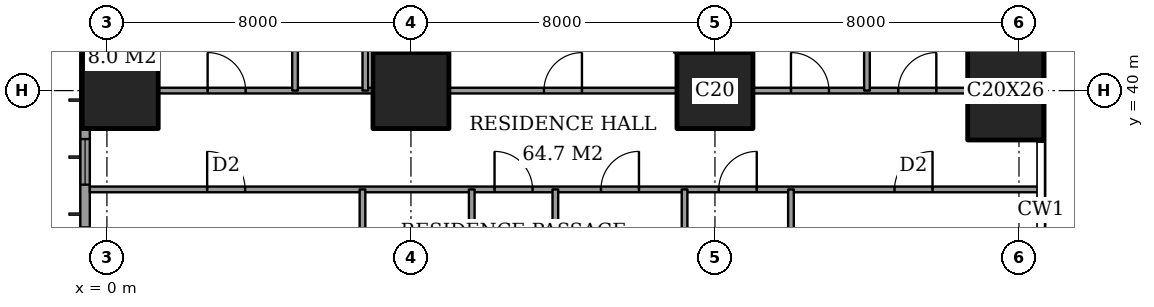
"""IFC4 building model, lengths in metres.
Left out: names, types, materials, properties, quantities, classifications, styles, units other than length and angle.
Written with IfcOpenShell. Run it as: python <this file> out.ifc"""

import sys

from ifc_helpers import new_model, si_unit, direction, frame, frame_2d, origin, origin_2d, place, context, subcontext, project, spatial, rectangle, extrude, element, fill, save


model = new_model("IFC4")
c1 = context("Model", 3, precision=1e-05, world=origin(), true_north=direction((0.0, 1.0)))
c2 = subcontext(c1, "Body", "Model", "MODEL_VIEW")
j1 = project(units=[si_unit("LENGTHUNIT", "METRE"), si_unit("PLANEANGLEUNIT", "RADIAN")], contexts=[c1])
p1 = place(None, origin())
s1 = spatial("IfcSite", under=j1, at=p1, CompositionType="ELEMENT")
p2 = place(p1, origin())
s2 = spatial("IfcBuilding", under=s1, at=p2, CompositionType="ELEMENT")
p3 = place(p2, frame((0.0, 0.0, 150.2)))
s3 = spatial("IfcBuildingStorey", under=s2, at=p3, CompositionType="ELEMENT", Elevation=150.2)
for number, where, z_axis, x_axis in (
    (1, (0.35, 40.0, 0.0), (0.0, 0.0, 1.0), (1.0, 0.0, 0.0)),
    (2, (8.0, 40.0, 0.0), (0.0, 0.0, 1.0), (1.0, 0.0, 0.0)),
    (3, (16.0, 40.0, 0.0), (0.0, 0.0, 1.0), (1.0, 0.0, 0.0)),
):
    element("IfcColumn", number, at=place(p3, frame(where, z_axis=z_axis, x_axis=x_axis)), inside=s3, PredefinedType="COLUMN", context=c2, shape_type="SweptSolid", body=[
        extrude(rectangle(XDim=2.0, YDim=2.0, at=origin_2d()), origin(), (0.0, 0.0, 1.0), 3.6),
    ])
p4 = place(p3, frame((23.65, 40.0, 0.0), z_axis=(0.0, 0.0, 1.0), x_axis=(1.0, 0.0, 0.0)))
e4 = element("IfcColumn", 4, at=p4, inside=s3, PredefinedType="COLUMN", context=c2, shape_type="SweptSolid", body=[
    extrude(rectangle(XDim=2.0, YDim=2.6, at=origin_2d()), origin(), (0.0, 0.0, 1.0), 3.6),
])
p5 = place(p3, frame((-0.575, 44.825, 0.0), z_axis=(0.0, 0.0, 1.0), x_axis=(0.0, -1.0, 0.0)))
e5 = element("IfcWall", 5, at=p5, inside=s3, PredefinedType="SOLIDWALL", context=c2, shape_type="SweptSolid", body=[
    extrude(rectangle(XDim=41.65, YDim=0.25, at=frame_2d((20.825, 0.0))), origin(), (0.0, 0.0, 1.0), 3.6),
])
p6 = place(p5, frame((0.775, 0.0, 0.4)))
e6 = element("IfcOpeningElement", 6, at=p6, cuts=e5, PredefinedType="OPENING", context=c2, shape_type="SweptSolid", body=[
    extrude(rectangle(XDim=2.4, YDim=2.2, at=frame_2d((1.2, 1.1))), frame((0.0, 0.135, 0.0), z_axis=(0.0, -1.0, 0.0), x_axis=(1.0, 0.0, 0.0)), (0.0, 0.0, 1.0), 0.27),
])
p7 = place(p5, frame((6.1, 0.0, 0.4)))
e7 = element("IfcOpeningElement", 7, at=p7, cuts=e5, PredefinedType="OPENING", context=c2, shape_type="SweptSolid", body=[
    extrude(rectangle(XDim=1.2, YDim=2.2, at=frame_2d((0.6, 1.1))), frame((0.0, 0.135, 0.0), z_axis=(0.0, -1.0, 0.0), x_axis=(1.0, 0.0, 0.0)), (0.0, 0.0, 1.0), 0.27),
])
p8 = place(p5, frame((8.425, 0.0, 0.4)))
e8 = element("IfcOpeningElement", 8, at=p8, cuts=e5, PredefinedType="OPENING", context=c2, shape_type="SweptSolid", body=[
    extrude(rectangle(XDim=2.4, YDim=2.2, at=frame_2d((1.2, 1.1))), frame((0.0, 0.135, 0.0), z_axis=(0.0, -1.0, 0.0), x_axis=(1.0, 0.0, 0.0)), (0.0, 0.0, 1.0), 0.27),
])
p9 = place(p5, frame((15.625, 0.0, 0.4)))
e9 = element("IfcOpeningElement", 9, at=p9, cuts=e5, PredefinedType="OPENING", context=c2, shape_type="SweptSolid", body=[
    extrude(rectangle(XDim=2.4, YDim=2.2, at=frame_2d((1.2, 1.1))), frame((0.0, 0.135, 0.0), z_axis=(0.0, -1.0, 0.0), x_axis=(1.0, 0.0, 0.0)), (0.0, 0.0, 1.0), 0.27),
])
p10 = place(p5, frame((23.625, 0.0, 0.4)))
e10 = element("IfcOpeningElement", 10, at=p10, cuts=e5, PredefinedType="OPENING", context=c2, shape_type="SweptSolid", body=[
    extrude(rectangle(XDim=2.4, YDim=2.2, at=frame_2d((1.2, 1.1))), frame((0.0, 0.135, 0.0), z_axis=(0.0, -1.0, 0.0), x_axis=(1.0, 0.0, 0.0)), (0.0, 0.0, 1.0), 0.27),
])
p11 = place(p5, frame((30.625, 0.0, 0.4)))
e11 = element("IfcOpeningElement", 11, at=p11, cuts=e5, PredefinedType="OPENING", context=c2, shape_type="SweptSolid", body=[
    extrude(rectangle(XDim=2.4, YDim=2.2, at=frame_2d((1.2, 1.1))), frame((0.0, 0.135, 0.0), z_axis=(0.0, -1.0, 0.0), x_axis=(1.0, 0.0, 0.0)), (0.0, 0.0, 1.0), 0.27),
])
p12 = place(p5, frame((34.225, 0.0, 0.4)))
e12 = element("IfcOpeningElement", 12, at=p12, cuts=e5, PredefinedType="OPENING", context=c2, shape_type="SweptSolid", body=[
    extrude(rectangle(XDim=1.2, YDim=2.2, at=frame_2d((0.6, 1.1))), frame((0.0, 0.135, 0.0), z_axis=(0.0, -1.0, 0.0), x_axis=(1.0, 0.0, 0.0)), (0.0, 0.0, 1.0), 0.27),
])
p13 = place(p5, frame((38.475, 0.0, 0.4)))
e13 = element("IfcOpeningElement", 13, at=p13, cuts=e5, PredefinedType="OPENING", context=c2, shape_type="SweptSolid", body=[
    extrude(rectangle(XDim=2.4, YDim=2.2, at=frame_2d((1.2, 1.1))), frame((0.0, 0.135, 0.0), z_axis=(0.0, -1.0, 0.0), x_axis=(1.0, 0.0, 0.0)), (0.0, 0.0, 1.0), 0.27),
])
p14 = place(p3, frame((-0.45, 37.4, 0.0), z_axis=(0.0, 0.0, 1.0), x_axis=(1.0, 0.0, 0.0)))
e14 = element("IfcWall", 14, at=p14, inside=s3, PredefinedType="PARTITIONING", context=c2, shape_type="SweptSolid", body=[
    extrude(rectangle(XDim=25.011, YDim=0.15, at=frame_2d((12.505, 0.0))), origin(), (0.0, 0.0, 1.0), 3.35),
])
p15 = place(p14, frame((10.65, 0.0, 0.0)))
e15 = element("IfcOpeningElement", 15, at=p15, cuts=e14, PredefinedType="OPENING", context=c2, shape_type="SweptSolid", body=[
    extrude(rectangle(XDim=1.0, YDim=2.1, at=frame_2d((0.5, 1.05))), frame((0.0, 0.085, 0.0), z_axis=(0.0, -1.0, 0.0), x_axis=(1.0, 0.0, 0.0)), (0.0, 0.0, 1.0), 0.17),
])
p16 = place(p14, frame((3.087, 0.0, 0.0)))
e16 = element("IfcOpeningElement", 16, at=p16, cuts=e14, PredefinedType="OPENING", context=c2, shape_type="SweptSolid", body=[
    extrude(rectangle(XDim=1.0, YDim=2.1, at=frame_2d((0.5, 1.05))), frame((0.0, 0.085, 0.0), z_axis=(0.0, -1.0, 0.0), x_axis=(1.0, 0.0, 0.0)), (0.0, 0.0, 1.0), 0.17),
])
p17 = place(p14, frame((13.45, 0.0, 0.0)))
e17 = element("IfcOpeningElement", 17, at=p17, cuts=e14, PredefinedType="OPENING", context=c2, shape_type="SweptSolid", body=[
    extrude(rectangle(XDim=1.0, YDim=2.1, at=frame_2d((0.5, 1.05))), frame((0.0, 0.085, 0.0), z_axis=(0.0, -1.0, 0.0), x_axis=(1.0, 0.0, 0.0)), (0.0, 0.0, 1.0), 0.17),
])
p18 = place(p14, frame((16.55, 0.0, 0.0)))
e18 = element("IfcOpeningElement", 18, at=p18, cuts=e14, PredefinedType="OPENING", context=c2, shape_type="SweptSolid", body=[
    extrude(rectangle(XDim=1.0, YDim=2.1, at=frame_2d((0.5, 1.05))), frame((0.0, 0.085, 0.0), z_axis=(0.0, -1.0, 0.0), x_axis=(1.0, 0.0, 0.0)), (0.0, 0.0, 1.0), 0.17),
])
p19 = place(p14, frame((21.175, 0.0, 0.0)))
e19 = element("IfcOpeningElement", 19, at=p19, cuts=e14, PredefinedType="OPENING", context=c2, shape_type="SweptSolid", body=[
    extrude(rectangle(XDim=1.0, YDim=2.1, at=frame_2d((0.5, 1.05))), frame((0.0, 0.085, 0.0), z_axis=(0.0, -1.0, 0.0), x_axis=(1.0, 0.0, 0.0)), (0.0, 0.0, 1.0), 0.17),
])
p20 = place(p3, frame((1.35, 40.0, 0.0), z_axis=(0.0, 0.0, 1.0), x_axis=(1.0, 0.0, 0.0)))
e20 = element("IfcWall", 20, at=p20, inside=s3, PredefinedType="PARTITIONING", context=c2, shape_type="SweptSolid", body=[
    extrude(rectangle(XDim=5.65, YDim=0.15, at=frame_2d((2.825, 0.0))), origin(), (0.0, 0.0, 1.0), 3.35),
])
p21 = place(p20, frame((1.3, 0.0, 0.0)))
e21 = element("IfcOpeningElement", 21, at=p21, cuts=e20, PredefinedType="OPENING", context=c2, shape_type="SweptSolid", body=[
    extrude(rectangle(XDim=1.0, YDim=2.1, at=frame_2d((0.5, 1.05))), frame((0.0, 0.085, 0.0), z_axis=(0.0, -1.0, 0.0), x_axis=(1.0, 0.0, 0.0)), (0.0, 0.0, 1.0), 0.17),
])
p22 = place(p3, frame((9.0, 40.0, 0.0), z_axis=(0.0, 0.0, 1.0), x_axis=(1.0, 0.0, 0.0)))
e22 = element("IfcWall", 22, at=p22, inside=s3, PredefinedType="PARTITIONING", context=c2, shape_type="SweptSolid", body=[
    extrude(rectangle(XDim=6.0, YDim=0.15, at=frame_2d((3.0, 0.0))), origin(), (0.0, 0.0, 1.0), 3.35),
])
p23 = place(p22, frame((2.5, 0.0, 0.0)))
e23 = element("IfcOpeningElement", 23, at=p23, cuts=e22, PredefinedType="OPENING", context=c2, shape_type="SweptSolid", body=[
    extrude(rectangle(XDim=1.0, YDim=2.1, at=frame_2d((0.5, 1.05))), frame((0.0, 0.085, 0.0), z_axis=(0.0, -1.0, 0.0), x_axis=(1.0, 0.0, 0.0)), (0.0, 0.0, 1.0), 0.17),
])
p24 = place(p3, frame((17.0, 40.0, 0.0), z_axis=(0.0, 0.0, 1.0), x_axis=(1.0, 0.0, 0.0)))
e24 = element("IfcWall", 24, at=p24, inside=s3, PredefinedType="PARTITIONING", context=c2, shape_type="SweptSolid", body=[
    extrude(rectangle(XDim=5.65, YDim=0.15, at=frame_2d((2.825, 0.0))), origin(), (0.0, 0.0, 1.0), 3.35),
])
p25 = place(p24, frame((1.0, 0.0, 0.0)))
e25 = element("IfcOpeningElement", 25, at=p25, cuts=e24, PredefinedType="OPENING", context=c2, shape_type="SweptSolid", body=[
    extrude(rectangle(XDim=1.0, YDim=2.1, at=frame_2d((0.5, 1.05))), frame((0.0, 0.085, 0.0), z_axis=(0.0, -1.0, 0.0), x_axis=(1.0, 0.0, 0.0)), (0.0, 0.0, 1.0), 0.17),
])
p26 = place(p24, frame((3.825, 0.0, 0.0)))
e26 = element("IfcOpeningElement", 26, at=p26, cuts=e24, PredefinedType="OPENING", context=c2, shape_type="SweptSolid", body=[
    extrude(rectangle(XDim=1.0, YDim=2.1, at=frame_2d((0.5, 1.05))), frame((0.0, 0.085, 0.0), z_axis=(0.0, -1.0, 0.0), x_axis=(1.0, 0.0, 0.0)), (0.0, 0.0, 1.0), 0.17),
])
p27 = place(p3, frame((4.95, 40.0, 0.0), z_axis=(0.0, 0.0, 1.0), x_axis=(0.0, 1.0, 0.0)))
e27 = element("IfcWall", 27, at=p27, inside=s3, PredefinedType="PARTITIONING", context=c2, shape_type="SweptSolid", body=[
    extrude(rectangle(XDim=8.45, YDim=0.15, at=frame_2d((4.225, 0.0))), origin(), (0.0, 0.0, 1.0), 3.35),
])
p28 = place(p27, frame((3.775, 0.0, 0.0)))
e28 = element("IfcOpeningElement", 28, at=p28, cuts=e27, PredefinedType="OPENING", context=c2, shape_type="SweptSolid", body=[
    extrude(rectangle(XDim=0.9, YDim=2.1, at=frame_2d((0.45, 1.05))), frame((0.0, 0.085, 0.0), z_axis=(0.0, -1.0, 0.0), x_axis=(1.0, 0.0, 0.0)), (0.0, 0.0, 1.0), 0.17),
])
p29 = place(p3, frame((6.725, 33.2, 0.0), z_axis=(0.0, 0.0, 1.0), x_axis=(0.0, 1.0, 0.0)))
e29 = element("IfcWall", 29, at=p29, inside=s3, PredefinedType="PARTITIONING", context=c2, shape_type="SweptSolid", body=[
    extrude(rectangle(XDim=4.2, YDim=0.15, at=frame_2d((2.1, 0.0))), origin(), (0.0, 0.0, 1.0), 3.35),
])
p30 = place(p29, frame((2.1, 0.0, 0.0)))
e30 = element("IfcOpeningElement", 30, at=p30, cuts=e29, PredefinedType="OPENING", context=c2, shape_type="SweptSolid", body=[
    extrude(rectangle(XDim=0.9, YDim=2.1, at=frame_2d((0.45, 1.05))), frame((0.0, 0.085, 0.0), z_axis=(0.0, -1.0, 0.0), x_axis=(1.0, 0.0, 0.0)), (0.0, 0.0, 1.0), 0.17),
])
p31 = place(p3, frame((6.8, 40.0, 0.0), z_axis=(0.0, 0.0, 1.0), x_axis=(0.0, 1.0, 0.0)))
e31 = element("IfcWall", 31, at=p31, inside=s3, PredefinedType="PARTITIONING", context=c2, shape_type="SweptSolid", body=[
    extrude(rectangle(XDim=8.45, YDim=0.15, at=frame_2d((4.225, 0.0))), origin(), (0.0, 0.0, 1.0), 3.35),
])
p32 = place(p3, frame((9.6, 28.0, 0.0), z_axis=(0.0, 0.0, 1.0), x_axis=(0.0, 1.0, 0.0)))
e32 = element("IfcWall", 32, at=p32, inside=s3, PredefinedType="PARTITIONING", context=c2, shape_type="SweptSolid", body=[
    extrude(rectangle(XDim=9.4, YDim=0.15, at=frame_2d((4.7, 0.0))), origin(), (0.0, 0.0, 1.0), 3.35),
])
p33 = place(p32, frame((0.5, 0.0, 0.0)))
e33 = element("IfcOpeningElement", 33, at=p33, cuts=e32, PredefinedType="OPENING", context=c2, shape_type="SweptSolid", body=[
    extrude(rectangle(XDim=1.0, YDim=2.1, at=frame_2d((0.5, 1.05))), frame((0.0, 0.085, 0.0), z_axis=(0.0, -1.0, 0.0), x_axis=(1.0, 0.0, 0.0)), (0.0, 0.0, 1.0), 0.17),
])
p34 = place(p3, frame((11.8, 30.0, 0.0), z_axis=(0.0, 0.0, 1.0), x_axis=(0.0, 1.0, 0.0)))
e34 = element("IfcWall", 34, at=p34, inside=s3, PredefinedType="PARTITIONING", context=c2, shape_type="SweptSolid", body=[
    extrude(rectangle(XDim=7.4, YDim=0.15, at=frame_2d((3.7, 0.0))), origin(), (0.0, 0.0, 1.0), 3.35),
])
p35 = place(p3, frame((15.2, 33.2, 0.0), z_axis=(0.0, 0.0, 1.0), x_axis=(0.0, 1.0, 0.0)))
e35 = element("IfcWall", 35, at=p35, inside=s3, PredefinedType="PARTITIONING", context=c2, shape_type="SweptSolid", body=[
    extrude(rectangle(XDim=4.2, YDim=0.15, at=frame_2d((2.1, 0.0))), origin(), (0.0, 0.0, 1.0), 3.35),
])
p36 = place(p3, frame((18.0, 31.4, 0.0), z_axis=(0.0, 0.0, 1.0), x_axis=(0.0, 1.0, 0.0)))
e36 = element("IfcWall", 36, at=p36, inside=s3, PredefinedType="PARTITIONING", context=c2, shape_type="SweptSolid", body=[
    extrude(rectangle(XDim=6.0, YDim=0.15, at=frame_2d((3.0, 0.0))), origin(), (0.0, 0.0, 1.0), 3.35),
])
p37 = place(p3, frame((20.0, 40.0, 0.0), z_axis=(0.0, 0.0, 1.0), x_axis=(0.0, 1.0, 0.0)))
e37 = element("IfcWall", 37, at=p37, inside=s3, PredefinedType="PARTITIONING", context=c2, shape_type="SweptSolid", body=[
    extrude(rectangle(XDim=8.45, YDim=0.15, at=frame_2d((4.225, 0.0))), origin(), (0.0, 0.0, 1.0), 3.35),
])
p38 = place(p7, origin())
e38 = element("IfcWindow", 38, at=p38, inside=s3, PartitioningType="SINGLE_PANEL", PredefinedType="WINDOW", context=c2, shape_type="SweptSolid", body=[
    extrude(rectangle(XDim=1.2, YDim=2.2, at=frame_2d((0.6, 1.1))), frame((0.0, 0.03, 0.0), z_axis=(0.0, -1.0, 0.0), x_axis=(1.0, 0.0, 0.0)), (0.0, 0.0, 1.0), 0.06),
])
fill(e7, e38)
p39 = place(p21, origin())
e39 = element("IfcDoor", 39, at=p39, inside=s3, OperationType="SINGLE_SWING_RIGHT", PredefinedType="DOOR", context=c2, shape_type="SweptSolid", body=[
    extrude(rectangle(XDim=1.0, YDim=2.1, at=frame_2d((0.5, 1.05))), frame((0.0, 0.025, 0.0), z_axis=(0.0, -1.0, 0.0), x_axis=(1.0, 0.0, 0.0)), (0.0, 0.0, 1.0), 0.05),
])
fill(e21, e39)
p40 = place(p23, origin())
e40 = element("IfcDoor", 40, at=p40, inside=s3, OperationType="SINGLE_SWING_LEFT", PredefinedType="DOOR", context=c2, shape_type="SweptSolid", body=[
    extrude(rectangle(XDim=1.0, YDim=2.1, at=frame_2d((0.5, 1.05))), frame((0.0, 0.025, 0.0), z_axis=(0.0, -1.0, 0.0), x_axis=(1.0, 0.0, 0.0)), (0.0, 0.0, 1.0), 0.05),
])
fill(e23, e40)
p41 = place(p25, origin())
e41 = element("IfcDoor", 41, at=p41, inside=s3, OperationType="SINGLE_SWING_RIGHT", PredefinedType="DOOR", context=c2, shape_type="SweptSolid", body=[
    extrude(rectangle(XDim=1.0, YDim=2.1, at=frame_2d((0.5, 1.05))), frame((0.0, 0.025, 0.0), z_axis=(0.0, -1.0, 0.0), x_axis=(1.0, 0.0, 0.0)), (0.0, 0.0, 1.0), 0.05),
])
fill(e25, e41)
p42 = place(p26, origin())
e42 = element("IfcDoor", 42, at=p42, inside=s3, OperationType="SINGLE_SWING_LEFT", PredefinedType="DOOR", context=c2, shape_type="SweptSolid", body=[
    extrude(rectangle(XDim=1.0, YDim=2.1, at=frame_2d((0.5, 1.05))), frame((0.0, 0.025, 0.0), z_axis=(0.0, -1.0, 0.0), x_axis=(1.0, 0.0, 0.0)), (0.0, 0.0, 1.0), 0.05),
])
fill(e26, e42)
p43 = place(p15, origin())
e43 = element("IfcDoor", 43, at=p43, inside=s3, OperationType="SINGLE_SWING_RIGHT", PredefinedType="DOOR", context=c2, shape_type="SweptSolid", body=[
    extrude(rectangle(XDim=1.0, YDim=2.1, at=frame_2d((0.5, 1.05))), frame((0.0, 0.025, 0.0), z_axis=(0.0, -1.0, 0.0), x_axis=(1.0, 0.0, 0.0)), (0.0, 0.0, 1.0), 0.05),
])
fill(e15, e43)
p44 = place(p16, origin())
e44 = element("IfcDoor", 44, at=p44, inside=s3, OperationType="SINGLE_SWING_RIGHT", PredefinedType="DOOR", context=c2, shape_type="SweptSolid", body=[
    extrude(rectangle(XDim=1.0, YDim=2.1, at=frame_2d((0.5, 1.05))), frame((0.0, 0.025, 0.0), z_axis=(0.0, -1.0, 0.0), x_axis=(1.0, 0.0, 0.0)), (0.0, 0.0, 1.0), 0.05),
])
fill(e16, e44)
p45 = place(p17, origin())
e45 = element("IfcDoor", 45, at=p45, inside=s3, OperationType="SINGLE_SWING_LEFT", PredefinedType="DOOR", context=c2, shape_type="SweptSolid", body=[
    extrude(rectangle(XDim=1.0, YDim=2.1, at=frame_2d((0.5, 1.05))), frame((0.0, 0.025, 0.0), z_axis=(0.0, -1.0, 0.0), x_axis=(1.0, 0.0, 0.0)), (0.0, 0.0, 1.0), 0.05),
])
fill(e17, e45)
p46 = place(p18, origin())
e46 = element("IfcDoor", 46, at=p46, inside=s3, OperationType="SINGLE_SWING_LEFT", PredefinedType="DOOR", context=c2, shape_type="SweptSolid", body=[
    extrude(rectangle(XDim=1.0, YDim=2.1, at=frame_2d((0.5, 1.05))), frame((0.0, 0.025, 0.0), z_axis=(0.0, -1.0, 0.0), x_axis=(1.0, 0.0, 0.0)), (0.0, 0.0, 1.0), 0.05),
])
fill(e18, e46)
p47 = place(p19, origin())
e47 = element("IfcDoor", 47, at=p47, inside=s3, OperationType="SINGLE_SWING_LEFT", PredefinedType="DOOR", context=c2, shape_type="SweptSolid", body=[
    extrude(rectangle(XDim=1.0, YDim=2.1, at=frame_2d((0.5, 1.05))), frame((0.0, 0.025, 0.0), z_axis=(0.0, -1.0, 0.0), x_axis=(1.0, 0.0, 0.0)), (0.0, 0.0, 1.0), 0.05),
])
fill(e19, e47)
save(model, sys.argv[1])
